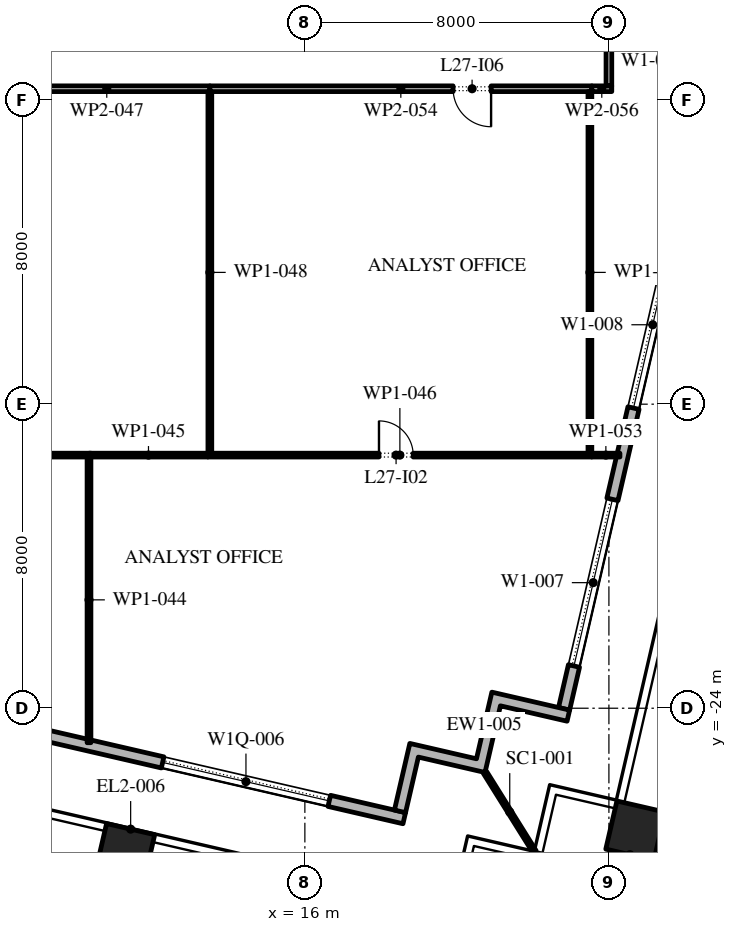
"""IFC4 building model, lengths in metres.
Left out: names, types, materials, properties, quantities, classifications, styles, units other than length and angle.
Written with IfcOpenShell. Run it as: python <this file> out.ifc"""

import sys

from ifc_helpers import new_model, si_unit, direction, frame, frame_2d, origin, origin_2d, place, context, subcontext, project, spatial, polyline, rectangle, outline, extrude, element, fill, save


model = new_model("IFC4")
c1 = context("Model", 3, precision=1e-05, world=origin(), true_north=direction((0.0, 1.0)))
c2 = subcontext(c1, "Body", "Model", "MODEL_VIEW")
j1 = project(units=[si_unit("LENGTHUNIT", "METRE"), si_unit("PLANEANGLEUNIT", "RADIAN")], contexts=[c1])
p1 = place(None, origin())
s1 = spatial("IfcSite", under=j1, at=p1, CompositionType="ELEMENT")
p2 = place(p1, origin())
s2 = spatial("IfcBuilding", under=s1, at=p2, CompositionType="ELEMENT")
p3 = place(p2, frame((0.0, 0.0, 126.6)))
s3 = spatial("IfcBuildingStorey", under=s2, at=p3, CompositionType="ELEMENT", Elevation=126.6)
for number, where, z_axis, x_axis in (
    (1, (11.27, -27.815, 0.0), (0.0, 0.0, 1.0), (0.974, -0.225, 0.0)),
    (2, (24.698, -27.22, 0.0), (0.0, 0.0, 1.0), (0.974, -0.225, 0.0)),
    (3, (22.539, -28.569, 0.0), (0.0, 0.0, 1.0), (0.974, -0.225, 0.0)),
):
    element("IfcColumn", number, at=place(p3, frame(where, z_axis=z_axis, x_axis=x_axis)), inside=s3, PredefinedType="COLUMN", context=c2, shape_type="SweptSolid", body=[
        extrude(rectangle(XDim=1.3, YDim=1.3, at=origin_2d()), origin(), (0.0, 0.0, 1.0), 4.2),
    ])
p4 = place(p3, frame((-31.078, -15.421, 0.0), z_axis=(0.0, 0.0, 1.0), x_axis=(0.974370456532, -0.224949357493, 0.0)))
e4 = element("IfcWall", 4, at=p4, inside=s3, PredefinedType="STANDARD", context=c2, shape_type="SweptSolid", body=[
    extrude(rectangle(XDim=51.0, YDim=0.3, at=frame_2d((25.5, 0.0))), origin(), (0.0, 0.0, 1.0), 4.0),
])
p5 = place(p4, frame((1.875, 0.0, 0.45)))
e5 = element("IfcOpeningElement", 5, at=p5, cuts=e4, PredefinedType="OPENING", context=c2, shape_type="SweptSolid", body=[
    extrude(rectangle(XDim=4.5, YDim=2.65, at=frame_2d((2.25, 1.325))), frame((0.0, 0.16, 0.0), z_axis=(0.0, -1.0, 0.0), x_axis=(1.0, 0.0, 0.0)), (0.0, 0.0, 1.0), 0.32),
])
p6 = place(p4, frame((10.275, 0.0, 0.45)))
e6 = element("IfcOpeningElement", 6, at=p6, cuts=e4, PredefinedType="OPENING", context=c2, shape_type="SweptSolid", body=[
    extrude(rectangle(XDim=4.5, YDim=2.525, at=frame_2d((2.25, 1.262))), frame((0.0, 0.16, 0.0), z_axis=(0.0, -1.0, 0.0), x_axis=(1.0, 0.0, 0.0)), (0.0, 0.0, 1.0), 0.32),
])
p7 = place(p4, frame((18.825, 0.0, 0.45)))
e7 = element("IfcOpeningElement", 7, at=p7, cuts=e4, PredefinedType="OPENING", context=c2, shape_type="SweptSolid", body=[
    extrude(rectangle(XDim=4.5, YDim=2.5, at=frame_2d((2.25, 1.25))), frame((0.0, 0.16, 0.0), z_axis=(0.0, -1.0, 0.0), x_axis=(1.0, 0.0, 0.0)), (0.0, 0.0, 1.0), 0.32),
])
p8 = place(p4, frame((28.425, 0.0, 0.0)))
e8 = element("IfcOpeningElement", 8, at=p8, cuts=e4, PredefinedType="OPENING", context=c2, shape_type="SweptSolid", body=[
    extrude(rectangle(XDim=2.4, YDim=2.9, at=frame_2d((1.2, 1.45))), frame((0.0, 0.16, 0.0), z_axis=(0.0, -1.0, 0.0), x_axis=(1.0, 0.0, 0.0)), (0.0, 0.0, 1.0), 0.32),
])
p9 = place(p4, frame((35.925, 0.0, 0.45)))
e9 = element("IfcOpeningElement", 9, at=p9, cuts=e4, PredefinedType="OPENING", context=c2, shape_type="SweptSolid", body=[
    extrude(rectangle(XDim=4.5, YDim=2.45, at=frame_2d((2.25, 1.225))), frame((0.0, 0.16, 0.0), z_axis=(0.0, -1.0, 0.0), x_axis=(1.0, 0.0, 0.0)), (0.0, 0.0, 1.0), 0.32),
])
p10 = place(p4, frame((44.475, 0.0, 0.45)))
e10 = element("IfcOpeningElement", 10, at=p10, cuts=e4, PredefinedType="OPENING", context=c2, shape_type="SweptSolid", body=[
    extrude(rectangle(XDim=4.5, YDim=2.45, at=frame_2d((2.25, 1.225))), frame((0.0, 0.16, 0.0), z_axis=(0.0, -1.0, 0.0), x_axis=(1.0, 0.0, 0.0)), (0.0, 0.0, 1.0), 0.32),
])
p11 = place(p3, frame((22.82, -24.016, 0.0), z_axis=(0.0, 0.0, 1.0), x_axis=(0.224953880882, 0.974369412223, 0.0)))
e11 = element("IfcWall", 11, at=p11, inside=s3, PredefinedType="STANDARD", context=c2, shape_type="SweptSolid", body=[
    extrude(rectangle(XDim=49.5, YDim=0.3, at=frame_2d((24.75, 0.0))), origin(), (0.0, 0.0, 1.0), 4.0),
])
p12 = place(p11, frame((1.157, 0.0, 0.45)))
e12 = element("IfcOpeningElement", 12, at=p12, cuts=e11, PredefinedType="OPENING", context=c2, shape_type="SweptSolid", body=[
    extrude(rectangle(XDim=4.5, YDim=3.05, at=frame_2d((2.25, 1.525))), frame((0.0, 0.16, 0.0), z_axis=(0.0, -1.0, 0.0), x_axis=(1.0, 0.0, 0.0)), (0.0, 0.0, 1.0), 0.32),
])
p13 = place(p11, frame((8.121, 0.0, 0.45)))
e13 = element("IfcOpeningElement", 13, at=p13, cuts=e11, PredefinedType="OPENING", context=c2, shape_type="SweptSolid", body=[
    extrude(rectangle(XDim=4.5, YDim=3.05, at=frame_2d((2.25, 1.525))), frame((0.0, 0.16, 0.0), z_axis=(0.0, -1.0, 0.0), x_axis=(1.0, 0.0, 0.0)), (0.0, 0.0, 1.0), 0.32),
])
p14 = place(p11, frame((15.236, 0.0, 0.45)))
e14 = element("IfcOpeningElement", 14, at=p14, cuts=e11, PredefinedType="OPENING", context=c2, shape_type="SweptSolid", body=[
    extrude(rectangle(XDim=4.5, YDim=3.05, at=frame_2d((2.25, 1.525))), frame((0.0, 0.16, 0.0), z_axis=(0.0, -1.0, 0.0), x_axis=(1.0, 0.0, 0.0)), (0.0, 0.0, 1.0), 0.32),
])
p15 = place(p11, frame((23.4, 0.0, 0.0)))
e15 = element("IfcOpeningElement", 15, at=p15, cuts=e11, PredefinedType="OPENING", context=c2, shape_type="SweptSolid", body=[
    extrude(rectangle(XDim=2.4, YDim=3.5, at=frame_2d((1.2, 1.75))), frame((0.0, 0.16, 0.0), z_axis=(0.0, -1.0, 0.0), x_axis=(1.0, 0.0, 0.0)), (0.0, 0.0, 1.0), 0.32),
])
p16 = place(p11, frame((29.464, 0.0, 0.45)))
e16 = element("IfcOpeningElement", 16, at=p16, cuts=e11, PredefinedType="OPENING", context=c2, shape_type="SweptSolid", body=[
    extrude(rectangle(XDim=4.5, YDim=2.875, at=frame_2d((2.25, 1.438))), frame((0.0, 0.16, 0.0), z_axis=(0.0, -1.0, 0.0), x_axis=(1.0, 0.0, 0.0)), (0.0, 0.0, 1.0), 0.32),
])
p17 = place(p11, frame((36.579, 0.0, 0.45)))
e17 = element("IfcOpeningElement", 17, at=p17, cuts=e11, PredefinedType="OPENING", context=c2, shape_type="SweptSolid", body=[
    extrude(rectangle(XDim=4.5, YDim=2.825, at=frame_2d((2.25, 1.413))), frame((0.0, 0.16, 0.0), z_axis=(0.0, -1.0, 0.0), x_axis=(1.0, 0.0, 0.0)), (0.0, 0.0, 1.0), 0.32),
])
p18 = place(p11, frame((43.693, 0.0, 0.45)))
e18 = element("IfcOpeningElement", 18, at=p18, cuts=e11, PredefinedType="OPENING", context=c2, shape_type="SweptSolid", body=[
    extrude(rectangle(XDim=4.5, YDim=2.75, at=frame_2d((2.25, 1.375))), frame((0.0, 0.16, 0.0), z_axis=(0.0, -1.0, 0.0), x_axis=(1.0, 0.0, 0.0)), (0.0, 0.0, 1.0), 0.32),
])
p19 = place(p3, origin())
e19 = element("IfcWall", 19, at=p19, inside=s3, PredefinedType="STANDARD", context=c2, shape_type="SweptSolid", body=[
    extrude(outline(polyline([(20.515, -25.331), (20.92, -23.577), (22.967, -24.049), (22.899, -24.342), (21.145, -23.937), (20.74, -25.691), (18.986, -25.286), (18.649, -26.747), (18.357, -26.68), (18.762, -24.926), (20.515, -25.331)])), origin(), (0.0, 0.0, 1.0), 4.0),
])
p20 = place(p3, frame((20.74, -25.691, -0.05), z_axis=(0.0, 0.0, 1.0), x_axis=(0.529972121605, -0.848015064914, 0.0)))
e20 = element("IfcWall", 20, at=p20, inside=s3, PredefinedType="STANDARD", context=c2, shape_type="SweptSolid", body=[
    extrude(rectangle(XDim=2.455, YDim=0.1, at=frame_2d((1.228, 0.0))), origin(), (0.0, 0.0, 1.0), 4.05),
])
p21 = place(p3, frame((2.04, -17.34, 0.0), z_axis=(0.0, 0.0, 1.0), x_axis=(1.0, 0.0, 0.0)))
e21 = element("IfcWall", 21, at=p21, inside=s3, PredefinedType="PARTITIONING", context=c2, shape_type="SweptSolid", body=[
    extrude(rectangle(XDim=8.33, YDim=0.1, at=frame_2d((4.165, 0.0))), origin(), (0.0, 0.0, 1.0), 4.0),
])
p22 = place(p3, frame((10.32, -17.39, 0.0), z_axis=(0.0, 0.0, 1.0), x_axis=(0.0, -1.0, 0.0)))
e22 = element("IfcWall", 22, at=p22, inside=s3, PredefinedType="PARTITIONING", context=c2, shape_type="SweptSolid", body=[
    extrude(rectangle(XDim=7.517, YDim=0.1, at=frame_2d((3.759, 0.0))), origin(), (0.0, 0.0, 1.0), 4.0),
])
p23 = place(p3, frame((10.32, -17.34, 0.0), z_axis=(0.0, 0.0, 1.0), x_axis=(1.0, 0.0, 0.0)))
e23 = element("IfcWall", 23, at=p23, inside=s3, PredefinedType="PARTITIONING", context=c2, shape_type="SweptSolid", body=[
    extrude(rectangle(XDim=3.13, YDim=0.1, at=frame_2d((1.565, 0.0))), origin(), (0.0, 0.0, 1.0), 4.0),
])
p24 = place(p3, frame((13.45, -17.34, 0.0), z_axis=(0.0, 0.0, 1.0), x_axis=(1.0, 0.0, 0.0)))
e24 = element("IfcWall", 24, at=p24, inside=s3, PredefinedType="PARTITIONING", context=c2, shape_type="SweptSolid", body=[
    extrude(rectangle(XDim=10.1, YDim=0.1, at=frame_2d((5.05, 0.0))), origin(), (0.0, 0.0, 1.0), 4.0),
])
p25 = place(p24, frame((4.5, 0.0, 0.0)))
e25 = element("IfcOpeningElement", 25, at=p25, cuts=e24, PredefinedType="OPENING", context=c2, shape_type="SweptSolid", body=[
    extrude(rectangle(XDim=0.9, YDim=2.1, at=frame_2d((0.45, 1.05))), frame((0.0, 0.06, 0.0), z_axis=(0.0, -1.0, 0.0), x_axis=(1.0, 0.0, 0.0)), (0.0, 0.0, 1.0), 0.12),
])
p26 = place(p3, frame((13.5, -7.7, 0.0), z_axis=(0.0, 0.0, 1.0), x_axis=(-1.0, 0.0, 0.0)))
e26 = element("IfcWall", 26, at=p26, inside=s3, PredefinedType="PARTITIONING", context=c2, shape_type="SweptSolid", body=[
    extrude(rectangle(XDim=5.425, YDim=0.15, at=frame_2d((2.712, 0.0))), origin(), (0.0, 0.0, 1.0), 4.0),
])
p27 = place(p3, frame((13.5, -7.775, 0.0), z_axis=(0.0, 0.0, 1.0), x_axis=(0.0, -1.0, 0.0)))
e27 = element("IfcWall", 27, at=p27, inside=s3, PredefinedType="PARTITIONING", context=c2, shape_type="SweptSolid", body=[
    extrude(rectangle(XDim=9.515, YDim=0.1, at=frame_2d((4.758, 0.0))), origin(), (0.0, 0.0, 1.0), 4.0),
])
p28 = place(p3, frame((23.55, -17.34, 0.0), z_axis=(0.0, 0.0, 1.0), x_axis=(1.0, 0.0, 0.0)))
e28 = element("IfcWall", 28, at=p28, inside=s3, PredefinedType="PARTITIONING", context=c2, shape_type="SweptSolid", body=[
    extrude(rectangle(XDim=0.74, YDim=0.1, at=frame_2d((0.37, 0.0))), origin(), (0.0, 0.0, 1.0), 4.0),
])
p29 = place(p3, frame((23.55, -7.7, 0.0), z_axis=(0.0, 0.0, 1.0), x_axis=(-1.0, 0.0, 0.0)))
e29 = element("IfcWall", 29, at=p29, inside=s3, PredefinedType="PARTITIONING", context=c2, shape_type="SweptSolid", body=[
    extrude(rectangle(XDim=10.05, YDim=0.15, at=frame_2d((5.025, 0.0))), origin(), (0.0, 0.0, 1.0), 4.0),
])
p30 = place(p29, frame((2.65, 0.0, 0.0)))
e30 = element("IfcOpeningElement", 30, at=p30, cuts=e29, PredefinedType="OPENING", context=c2, shape_type="SweptSolid", body=[
    extrude(rectangle(XDim=1.0, YDim=2.1, at=frame_2d((0.5, 1.05))), frame((0.0, 0.085, 0.0), z_axis=(0.0, -1.0, 0.0), x_axis=(1.0, 0.0, 0.0)), (0.0, 0.0, 1.0), 0.17),
])
p31 = place(p3, frame((23.5, -7.775, 0.0), z_axis=(0.0, 0.0, 1.0), x_axis=(0.0, -1.0, 0.0)))
e31 = element("IfcWall", 31, at=p31, inside=s3, PredefinedType="PARTITIONING", context=c2, shape_type="SweptSolid", body=[
    extrude(rectangle(XDim=9.515, YDim=0.1, at=frame_2d((4.758, 0.0))), origin(), (0.0, 0.0, 1.0), 4.0),
])
p32 = place(p3, frame((24.075, -7.7, 0.0), z_axis=(0.0, 0.0, 1.0), x_axis=(-1.0, 0.0, 0.0)))
e32 = element("IfcWall", 32, at=p32, inside=s3, PredefinedType="PARTITIONING", context=c2, shape_type="SweptSolid", body=[
    extrude(rectangle(XDim=0.525, YDim=0.15, at=frame_2d((0.262, 0.0))), origin(), (0.0, 0.0, 1.0), 4.0),
])
p33 = place(p3, frame((24.0, -3.43, 0.0), z_axis=(0.0, 0.0, 1.0), x_axis=(0.0, -1.0, 0.0)))
e33 = element("IfcWall", 33, at=p33, inside=s3, PredefinedType="PARTITIONING", context=c2, shape_type="SweptSolid", body=[
    extrude(rectangle(XDim=4.195, YDim=0.15, at=frame_2d((2.098, 0.0))), origin(), (0.0, 0.0, 1.0), 4.0),
])
p34 = place(p33, frame((2.12, 0.0, 0.0)))
e34 = element("IfcOpeningElement", 34, at=p34, cuts=e33, PredefinedType="OPENING", context=c2, shape_type="SweptSolid", body=[
    extrude(rectangle(XDim=1.0, YDim=2.1, at=frame_2d((0.5, 1.05))), frame((0.0, 0.085, 0.0), z_axis=(0.0, -1.0, 0.0), x_axis=(1.0, 0.0, 0.0)), (0.0, 0.0, 1.0), 0.17),
])
p35 = place(p10, origin())
e35 = element("IfcWindow", 35, at=p35, inside=s3, PartitioningType="DOUBLE_PANEL_VERTICAL", PredefinedType="WINDOW", context=c2, shape_type="SweptSolid", body=[
    extrude(rectangle(XDim=4.5, YDim=2.45, at=frame_2d((2.25, 1.225))), frame((0.0, 0.03, 0.0), z_axis=(0.0, -1.0, 0.0), x_axis=(1.0, 0.0, 0.0)), (0.0, 0.0, 1.0), 0.06),
])
fill(e10, e35)
p36 = place(p12, origin())
e36 = element("IfcWindow", 36, at=p36, inside=s3, PartitioningType="DOUBLE_PANEL_VERTICAL", PredefinedType="WINDOW", context=c2, shape_type="SweptSolid", body=[
    extrude(rectangle(XDim=4.5, YDim=3.05, at=frame_2d((2.25, 1.525))), frame((0.0, 0.03, 0.0), z_axis=(0.0, -1.0, 0.0), x_axis=(1.0, 0.0, 0.0)), (0.0, 0.0, 1.0), 0.06),
])
fill(e12, e36)
p37 = place(p13, origin())
e37 = element("IfcWindow", 37, at=p37, inside=s3, PartitioningType="DOUBLE_PANEL_VERTICAL", PredefinedType="WINDOW", context=c2, shape_type="SweptSolid", body=[
    extrude(rectangle(XDim=4.5, YDim=3.05, at=frame_2d((2.25, 1.525))), frame((0.0, 0.03, 0.0), z_axis=(0.0, -1.0, 0.0), x_axis=(1.0, 0.0, 0.0)), (0.0, 0.0, 1.0), 0.06),
])
fill(e13, e37)
p38 = place(p25, origin())
e38 = element("IfcDoor", 38, at=p38, inside=s3, OperationType="SINGLE_SWING_RIGHT", PredefinedType="DOOR", context=c2, shape_type="SweptSolid", body=[
    extrude(rectangle(XDim=0.9, YDim=2.1, at=frame_2d((0.45, 1.05))), frame((0.0, 0.025, 0.0), z_axis=(0.0, -1.0, 0.0), x_axis=(1.0, 0.0, 0.0)), (0.0, 0.0, 1.0), 0.05),
])
fill(e25, e38)
p39 = place(p30, origin())
e39 = element("IfcDoor", 39, at=p39, inside=s3, OperationType="SINGLE_SWING_RIGHT", PredefinedType="DOOR", context=c2, shape_type="SweptSolid", body=[
    extrude(rectangle(XDim=1.0, YDim=2.1, at=frame_2d((0.5, 1.05))), frame((0.0, 0.025, 0.0), z_axis=(0.0, -1.0, 0.0), x_axis=(1.0, 0.0, 0.0)), (0.0, 0.0, 1.0), 0.05),
])
fill(e30, e39)
save(model, sys.argv[1])
